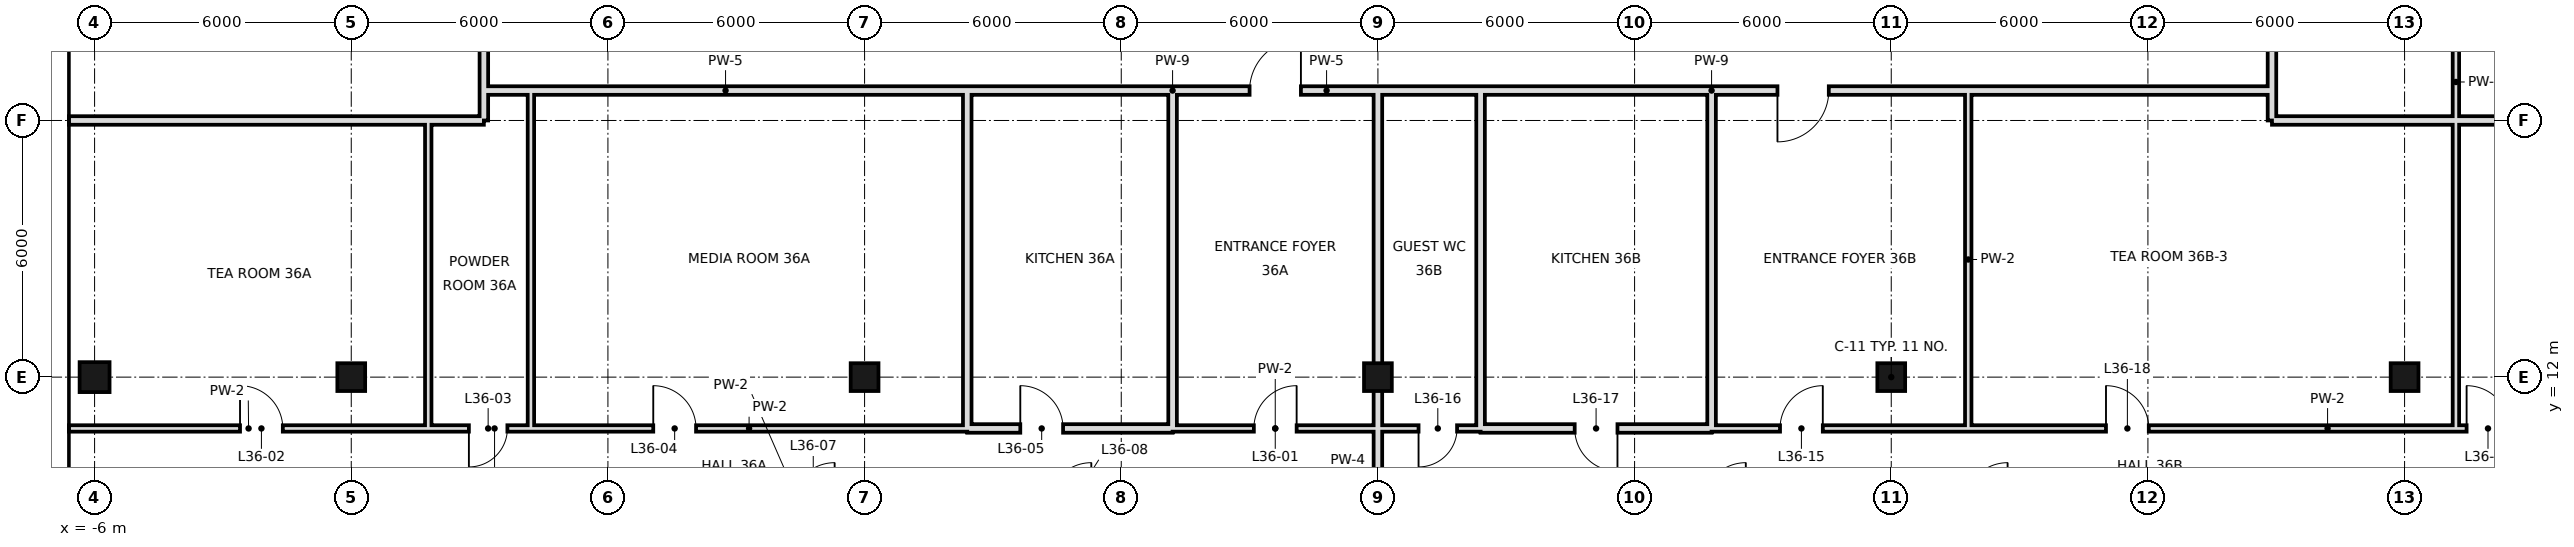
"""IFC4 building model, lengths in metres.
Left out: names, types, materials, properties, quantities, classifications, styles, units other than length and angle.
Written with IfcOpenShell. Run it as: python <this file> out.ifc"""

import sys

from ifc_helpers import new_model, si_unit, direction, frame, frame_2d, origin, origin_2d, place, context, subcontext, project, spatial, rectangle, hollow_rectangle, extrude, element, fill, save


model = new_model("IFC4")
c1 = context("Model", 3, precision=1e-05, world=origin(), true_north=direction((0.0, 1.0)))
c2 = subcontext(c1, "Body", "Model", "MODEL_VIEW")
j1 = project(units=[si_unit("LENGTHUNIT", "METRE"), si_unit("PLANEANGLEUNIT", "RADIAN")], contexts=[c1])
p1 = place(None, origin())
s1 = spatial("IfcSite", under=j1, at=p1, CompositionType="ELEMENT")
p2 = place(p1, origin())
s2 = spatial("IfcBuilding", under=s1, at=p2, CompositionType="ELEMENT")
p3 = place(p2, frame((0.0, 0.0, 158.2)))
s3 = spatial("IfcBuildingStorey", under=s2, at=p3, CompositionType="ELEMENT", Elevation=158.2)
p4 = place(p3, frame((-6.0, 12.0, 0.0), z_axis=(0.0, 0.0, 1.0), x_axis=(1.0, 0.0, 0.0)))
e1 = element("IfcColumn", 1, at=p4, inside=s3, PredefinedType="COLUMN", context=c2, shape_type="SweptSolid", body=[
    extrude(hollow_rectangle(XDim=0.7, YDim=0.7, WallThickness=0.036, at=origin_2d()), origin(), (0.0, 0.0, 1.0), 3.6),
])
for number, where, z_axis, x_axis in (
    (2, (0.0, 12.0, 0.0), (0.0, 0.0, 1.0), (1.0, 0.0, 0.0)),
    (3, (12.0, 12.0, 0.0), (0.0, 0.0, 1.0), (1.0, 0.0, 0.0)),
    (4, (24.0, 12.0, 0.0), (0.0, 0.0, 1.0), (1.0, 0.0, 0.0)),
    (5, (36.0, 12.0, 0.0), (0.0, 0.0, 1.0), (1.0, 0.0, 0.0)),
    (6, (48.0, 12.0, 0.0), (0.0, 0.0, 1.0), (1.0, 0.0, 0.0)),
):
    element("IfcColumn", number, at=place(p3, frame(where, z_axis=z_axis, x_axis=x_axis)), inside=s3, PredefinedType="COLUMN", context=c2, shape_type="SweptSolid", body=[
        extrude(hollow_rectangle(XDim=0.65, YDim=0.65, WallThickness=0.032, at=origin_2d()), origin(), (0.0, 0.0, 1.0), 3.6),
    ])
p5 = place(p3, frame((1.8, 10.8, 0.0), z_axis=(0.0, 0.0, 1.0), x_axis=(0.0, 1.0, 0.0)))
e7 = element("IfcWall", 7, at=p5, inside=s3, PredefinedType="PARTITIONING", context=c2, shape_type="SweptSolid", body=[
    extrude(rectangle(XDim=7.2, YDim=0.15, at=frame_2d((3.6, 0.0))), origin(), (0.0, 0.0, 1.0), 3.38),
])
for number, where, z_axis, x_axis in (
    (8, (14.4, 10.8, 0.0), (0.0, 0.0, 1.0), (0.0, 1.0, 0.0)),
    (9, (19.2, 10.8, 0.0), (0.0, 0.0, 1.0), (0.0, 1.0, 0.0)),
):
    element("IfcWall", number, at=place(p3, frame(where, z_axis=z_axis, x_axis=x_axis)), inside=s3, PredefinedType="SOLIDWALL", context=c2, shape_type="SweptSolid", body=[
        extrude(rectangle(XDim=7.9, YDim=0.2, at=frame_2d((3.95, 0.0))), origin(), (0.0, 0.0, 1.0), 2.68),
    ])
p6 = place(p3, frame((24.0, 0.0, 0.0), z_axis=(0.0, 0.0, 1.0), x_axis=(0.0, 1.0, 0.0)))
e10 = element("IfcWall", 10, at=p6, inside=s3, PredefinedType="SOLIDWALL", context=c2, shape_type="SweptSolid", body=[
    extrude(rectangle(XDim=18.7, YDim=0.2, at=frame_2d((9.35, 0.0))), origin(), (0.0, 0.0, 1.0), 2.68),
])
p7 = place(p3, frame((26.4, 10.8, 0.0), z_axis=(0.0, 0.0, 1.0), x_axis=(0.0, 1.0, 0.0)))
e11 = element("IfcWall", 11, at=p7, inside=s3, PredefinedType="SOLIDWALL", context=c2, shape_type="SweptSolid", body=[
    extrude(rectangle(XDim=7.9, YDim=0.2, at=frame_2d((3.95, 0.0))), origin(), (0.0, 0.0, 1.0), 2.68),
])
p8 = place(p3, frame((3.1, 18.0, 0.0), z_axis=(0.0, 0.0, 1.0), x_axis=(0.0, 1.0, 0.0)))
e12 = element("IfcWall", 12, at=p8, inside=s3, PredefinedType="SOLIDWALL", context=c2, shape_type="SweptSolid", body=[
    extrude(rectangle(XDim=30.6, YDim=0.2, at=frame_2d((15.3, 0.0))), origin(), (0.0, 0.0, 1.0), 2.68),
])
p9 = place(p8, frame((20.27, 0.0, 0.0)))
e13 = element("IfcOpeningElement", 13, at=p9, cuts=e12, PredefinedType="OPENING", context=c2, shape_type="SweptSolid", body=[
    extrude(rectangle(XDim=1.2, YDim=2.4, at=frame_2d((0.6, 1.2))), frame((0.0, 0.11, 0.0), z_axis=(0.0, -1.0, 0.0), x_axis=(1.0, 0.0, 0.0)), (0.0, 0.0, 1.0), 0.22),
])
p10 = place(p3, frame((31.8, 10.8, 0.0), z_axis=(0.0, 0.0, 1.0), x_axis=(0.0, 1.0, 0.0)))
e14 = element("IfcWall", 14, at=p10, inside=s3, PredefinedType="SOLIDWALL", context=c2, shape_type="SweptSolid", body=[
    extrude(rectangle(XDim=7.9, YDim=0.2, at=frame_2d((3.95, 0.0))), origin(), (0.0, 0.0, 1.0), 3.38),
])
for number, where, z_axis, x_axis in (
    (15, (37.8, 10.8, 0.0), (0.0, 0.0, 1.0), (0.0, 1.0, 0.0)),
    (16, (4.2, 10.8, 0.0), (0.0, 0.0, 1.0), (0.0, 1.0, 0.0)),
):
    element("IfcWall", number, at=place(p3, frame(where, z_axis=z_axis, x_axis=x_axis)), inside=s3, PredefinedType="PARTITIONING", context=c2, shape_type="SweptSolid", body=[
        extrude(rectangle(XDim=7.9, YDim=0.15, at=frame_2d((3.95, 0.0))), origin(), (0.0, 0.0, 1.0), 3.38),
    ])
p11 = place(p3, frame((44.9, 18.7, 0.0), z_axis=(0.0, 0.0, 1.0), x_axis=(0.0, 1.0, 0.0)))
e17 = element("IfcWall", 17, at=p11, inside=s3, PredefinedType="SOLIDWALL", context=c2, shape_type="SweptSolid", body=[
    extrude(rectangle(XDim=25.7, YDim=0.2, at=frame_2d((12.85, 0.0))), origin(), (0.0, 0.0, 1.0), 2.93),
])
p12 = place(p11, frame((12.5, 0.0, 0.0)))
e18 = element("IfcOpeningElement", 18, at=p12, cuts=e17, PredefinedType="OPENING", context=c2, shape_type="SweptSolid", body=[
    extrude(rectangle(XDim=1.2, YDim=2.4, at=frame_2d((0.6, 1.2))), frame((0.0, 0.11, 0.0), z_axis=(0.0, -1.0, 0.0), x_axis=(1.0, 0.0, 0.0)), (0.0, 0.0, 1.0), 0.22),
])
p13 = place(p3, frame((44.9, 18.0, 0.0), z_axis=(0.0, 0.0, 1.0), x_axis=(0.0, 1.0, 0.0)))
e19 = element("IfcWall", 19, at=p13, inside=s3, PredefinedType="SOLIDWALL", context=c2, shape_type="SweptSolid", body=[
    extrude(rectangle(XDim=0.7, YDim=0.2, at=frame_2d((0.35, 0.0))), origin(), (0.0, 0.0, 1.0), 2.93),
])
p14 = place(p3, frame((49.2, 10.8, 0.0), z_axis=(0.0, 0.0, 1.0), x_axis=(0.0, 1.0, 0.0)))
e20 = element("IfcWall", 20, at=p14, inside=s3, PredefinedType="PARTITIONING", context=c2, shape_type="SweptSolid", body=[
    extrude(rectangle(XDim=16.2, YDim=0.15, at=frame_2d((8.1, 0.0))), origin(), (0.0, 0.0, 1.0), 3.38),
])
p15 = place(p14, frame((11.2, 0.0, 0.0)))
e21 = element("IfcOpeningElement", 21, at=p15, cuts=e20, PredefinedType="OPENING", context=c2, shape_type="SweptSolid", body=[
    extrude(rectangle(XDim=1.0, YDim=2.4, at=frame_2d((0.5, 1.2))), frame((0.0, 0.085, 0.0), z_axis=(0.0, -1.0, 0.0), x_axis=(1.0, 0.0, 0.0)), (0.0, 0.0, 1.0), 0.17),
])
p16 = place(p3, frame((14.4, 10.8, 0.0), z_axis=(0.0, 0.0, 1.0), x_axis=(1.0, 0.0, 0.0)))
e22 = element("IfcWall", 22, at=p16, inside=s3, PredefinedType="SOLIDWALL", context=c2, shape_type="SweptSolid", body=[
    extrude(rectangle(XDim=4.8, YDim=0.2, at=frame_2d((2.4, 0.0))), origin(), (0.0, 0.0, 1.0), 2.68),
])
p17 = place(p16, frame((1.24, 0.0, 0.0)))
e23 = element("IfcOpeningElement", 23, at=p17, cuts=e22, PredefinedType="OPENING", context=c2, shape_type="SweptSolid", body=[
    extrude(rectangle(XDim=1.0, YDim=2.4, at=frame_2d((0.5, 1.2))), frame((0.0, 0.11, 0.0), z_axis=(0.0, -1.0, 0.0), x_axis=(1.0, 0.0, 0.0)), (0.0, 0.0, 1.0), 0.22),
])
p18 = place(p3, frame((26.4, 10.8, 0.0), z_axis=(0.0, 0.0, 1.0), x_axis=(1.0, 0.0, 0.0)))
e24 = element("IfcWall", 24, at=p18, inside=s3, PredefinedType="SOLIDWALL", context=c2, shape_type="SweptSolid", body=[
    extrude(rectangle(XDim=5.4, YDim=0.2, at=frame_2d((2.7, 0.0))), origin(), (0.0, 0.0, 1.0), 2.68),
])
p19 = place(p18, frame((2.2, 0.0, 0.0)))
e25 = element("IfcOpeningElement", 25, at=p19, cuts=e24, PredefinedType="OPENING", context=c2, shape_type="SweptSolid", body=[
    extrude(rectangle(XDim=1.0, YDim=2.4, at=frame_2d((0.5, 1.2))), frame((0.0, 0.11, 0.0), z_axis=(0.0, -1.0, 0.0), x_axis=(1.0, 0.0, 0.0)), (0.0, 0.0, 1.0), 0.22),
])
p20 = place(p3, frame((-6.6, 10.8, 0.0), z_axis=(0.0, 0.0, 1.0), x_axis=(1.0, 0.0, 0.0)))
e26 = element("IfcWall", 26, at=p20, inside=s3, PredefinedType="PARTITIONING", context=c2, shape_type="SweptSolid", body=[
    extrude(rectangle(XDim=8.4, YDim=0.15, at=frame_2d((4.2, 0.0))), origin(), (0.0, 0.0, 1.0), 3.38),
])
p21 = place(p20, frame((4.0, 0.0, 0.0)))
e27 = element("IfcOpeningElement", 27, at=p21, cuts=e26, PredefinedType="OPENING", context=c2, shape_type="SweptSolid", body=[
    extrude(rectangle(XDim=1.0, YDim=2.4, at=frame_2d((0.5, 1.2))), frame((0.0, 0.085, 0.0), z_axis=(0.0, -1.0, 0.0), x_axis=(1.0, 0.0, 0.0)), (0.0, 0.0, 1.0), 0.17),
])
p22 = place(p3, frame((4.2, 10.8, 0.0), z_axis=(0.0, 0.0, 1.0), x_axis=(1.0, 0.0, 0.0)))
e28 = element("IfcWall", 28, at=p22, inside=s3, PredefinedType="PARTITIONING", context=c2, shape_type="SweptSolid", body=[
    extrude(rectangle(XDim=10.2, YDim=0.15, at=frame_2d((5.1, 0.0))), origin(), (0.0, 0.0, 1.0), 3.38),
])
p23 = place(p22, frame((2.86, 0.0, 0.0)))
e29 = element("IfcOpeningElement", 29, at=p23, cuts=e28, PredefinedType="OPENING", context=c2, shape_type="SweptSolid", body=[
    extrude(rectangle(XDim=1.0, YDim=2.4, at=frame_2d((0.5, 1.2))), frame((0.0, 0.085, 0.0), z_axis=(0.0, -1.0, 0.0), x_axis=(1.0, 0.0, 0.0)), (0.0, 0.0, 1.0), 0.17),
])
p24 = place(p3, frame((19.2, 10.8, 0.0), z_axis=(0.0, 0.0, 1.0), x_axis=(1.0, 0.0, 0.0)))
e30 = element("IfcWall", 30, at=p24, inside=s3, PredefinedType="PARTITIONING", context=c2, shape_type="SweptSolid", body=[
    extrude(rectangle(XDim=4.8, YDim=0.15, at=frame_2d((2.4, 0.0))), origin(), (0.0, 0.0, 1.0), 3.38),
])
p25 = place(p24, frame((1.9, 0.0, 0.0)))
e31 = element("IfcOpeningElement", 31, at=p25, cuts=e30, PredefinedType="OPENING", context=c2, shape_type="SweptSolid", body=[
    extrude(rectangle(XDim=1.0, YDim=2.4, at=frame_2d((0.5, 1.2))), frame((0.0, 0.085, 0.0), z_axis=(0.0, -1.0, 0.0), x_axis=(1.0, 0.0, 0.0)), (0.0, 0.0, 1.0), 0.17),
])
p26 = place(p3, frame((31.8, 10.8, 0.0), z_axis=(0.0, 0.0, 1.0), x_axis=(1.0, 0.0, 0.0)))
e32 = element("IfcWall", 32, at=p26, inside=s3, PredefinedType="PARTITIONING", context=c2, shape_type="SweptSolid", body=[
    extrude(rectangle(XDim=28.8, YDim=0.15, at=frame_2d((14.4, 0.0))), origin(), (0.0, 0.0, 1.0), 3.38),
])
p27 = place(p26, frame((1.6, 0.0, 0.0)))
e33 = element("IfcOpeningElement", 33, at=p27, cuts=e32, PredefinedType="OPENING", context=c2, shape_type="SweptSolid", body=[
    extrude(rectangle(XDim=1.0, YDim=2.4, at=frame_2d((0.5, 1.2))), frame((0.0, 0.085, 0.0), z_axis=(0.0, -1.0, 0.0), x_axis=(1.0, 0.0, 0.0)), (0.0, 0.0, 1.0), 0.17),
])
p28 = place(p26, frame((9.22, 0.0, 0.0)))
e34 = element("IfcOpeningElement", 34, at=p28, cuts=e32, PredefinedType="OPENING", context=c2, shape_type="SweptSolid", body=[
    extrude(rectangle(XDim=1.0, YDim=2.4, at=frame_2d((0.5, 1.2))), frame((0.0, 0.085, 0.0), z_axis=(0.0, -1.0, 0.0), x_axis=(1.0, 0.0, 0.0)), (0.0, 0.0, 1.0), 0.17),
])
p29 = place(p26, frame((17.65, 0.0, 0.0)))
e35 = element("IfcOpeningElement", 35, at=p29, cuts=e32, PredefinedType="OPENING", context=c2, shape_type="SweptSolid", body=[
    extrude(rectangle(XDim=1.0, YDim=2.4, at=frame_2d((0.5, 1.2))), frame((0.0, 0.085, 0.0), z_axis=(0.0, -1.0, 0.0), x_axis=(1.0, 0.0, 0.0)), (0.0, 0.0, 1.0), 0.17),
])
p30 = place(p3, frame((1.8, 10.8, 0.0), z_axis=(0.0, 0.0, 1.0), x_axis=(1.0, 0.0, 0.0)))
e36 = element("IfcWall", 36, at=p30, inside=s3, PredefinedType="PARTITIONING", context=c2, shape_type="SweptSolid", body=[
    extrude(rectangle(XDim=2.4, YDim=0.15, at=frame_2d((1.2, 0.0))), origin(), (0.0, 0.0, 1.0), 3.38),
])
p31 = place(p30, frame((0.95, 0.0, 0.0)))
e37 = element("IfcOpeningElement", 37, at=p31, cuts=e36, PredefinedType="OPENING", context=c2, shape_type="SweptSolid", body=[
    extrude(rectangle(XDim=0.9, YDim=2.4, at=frame_2d((0.45, 1.2))), frame((0.0, 0.085, 0.0), z_axis=(0.0, -1.0, 0.0), x_axis=(1.0, 0.0, 0.0)), (0.0, 0.0, 1.0), 0.17),
])
p32 = place(p3, frame((24.0, 10.8, 0.0), z_axis=(0.0, 0.0, 1.0), x_axis=(1.0, 0.0, 0.0)))
e38 = element("IfcWall", 38, at=p32, inside=s3, PredefinedType="PARTITIONING", context=c2, shape_type="SweptSolid", body=[
    extrude(rectangle(XDim=2.4, YDim=0.15, at=frame_2d((1.2, 0.0))), origin(), (0.0, 0.0, 1.0), 3.38),
])
p33 = place(p32, frame((0.95, 0.0, 0.0)))
e39 = element("IfcOpeningElement", 39, at=p33, cuts=e38, PredefinedType="OPENING", context=c2, shape_type="SweptSolid", body=[
    extrude(rectangle(XDim=0.9, YDim=2.4, at=frame_2d((0.45, 1.2))), frame((0.0, 0.085, 0.0), z_axis=(0.0, -1.0, 0.0), x_axis=(1.0, 0.0, 0.0)), (0.0, 0.0, 1.0), 0.17),
])
p34 = place(p3, frame((-6.6, 18.0, 0.0), z_axis=(0.0, 0.0, 1.0), x_axis=(1.0, 0.0, 0.0)))
e40 = element("IfcWall", 40, at=p34, inside=s3, PredefinedType="SOLIDWALL", context=c2, shape_type="SweptSolid", body=[
    extrude(rectangle(XDim=9.7, YDim=0.2, at=frame_2d((4.85, 0.0))), origin(), (0.0, 0.0, 1.0), 2.68),
])
p35 = place(p3, frame((44.9, 18.0, 0.0), z_axis=(0.0, 0.0, 1.0), x_axis=(1.0, 0.0, 0.0)))
e41 = element("IfcWall", 41, at=p35, inside=s3, PredefinedType="SOLIDWALL", context=c2, shape_type="SweptSolid", body=[
    extrude(rectangle(XDim=15.7, YDim=0.2, at=frame_2d((7.85, 0.0))), origin(), (0.0, 0.0, 1.0), 2.68),
])
p36 = place(p3, frame((3.1, 18.7, 0.0), z_axis=(0.0, 0.0, 1.0), x_axis=(1.0, 0.0, 0.0)))
e42 = element("IfcWall", 42, at=p36, inside=s3, PredefinedType="SOLIDWALL", context=c2, shape_type="SweptSolid", body=[
    extrude(rectangle(XDim=11.3, YDim=0.2, at=frame_2d((5.65, 0.0))), origin(), (0.0, 0.0, 1.0), 2.68),
])
p37 = place(p3, frame((19.2, 18.7, 0.0), z_axis=(0.0, 0.0, 1.0), x_axis=(1.0, 0.0, 0.0)))
e43 = element("IfcWall", 43, at=p37, inside=s3, PredefinedType="SOLIDWALL", context=c2, shape_type="SweptSolid", body=[
    extrude(rectangle(XDim=7.2, YDim=0.2, at=frame_2d((3.6, 0.0))), origin(), (0.0, 0.0, 1.0), 3.38),
])
p38 = place(p37, frame((1.8, 0.0, 0.0)))
e44 = element("IfcOpeningElement", 44, at=p38, cuts=e43, PredefinedType="OPENING", context=c2, shape_type="SweptSolid", body=[
    extrude(rectangle(XDim=1.2, YDim=2.4, at=frame_2d((0.6, 1.2))), frame((0.0, 0.11, 0.0), z_axis=(0.0, -1.0, 0.0), x_axis=(1.0, 0.0, 0.0)), (0.0, 0.0, 1.0), 0.22),
])
p39 = place(p3, frame((31.8, 18.7, 0.0), z_axis=(0.0, 0.0, 1.0), x_axis=(1.0, 0.0, 0.0)))
e45 = element("IfcWall", 45, at=p39, inside=s3, PredefinedType="SOLIDWALL", context=c2, shape_type="SweptSolid", body=[
    extrude(rectangle(XDim=13.1, YDim=0.2, at=frame_2d((6.55, 0.0))), origin(), (0.0, 0.0, 1.0), 2.68),
])
p40 = place(p39, frame((1.54, 0.0, 0.0)))
e46 = element("IfcOpeningElement", 46, at=p40, cuts=e45, PredefinedType="OPENING", context=c2, shape_type="SweptSolid", body=[
    extrude(rectangle(XDim=1.2, YDim=2.4, at=frame_2d((0.6, 1.2))), frame((0.0, 0.11, 0.0), z_axis=(0.0, -1.0, 0.0), x_axis=(1.0, 0.0, 0.0)), (0.0, 0.0, 1.0), 0.22),
])
p41 = place(p3, frame((14.4, 18.7, 0.0), z_axis=(0.0, 0.0, 1.0), x_axis=(1.0, 0.0, 0.0)))
e47 = element("IfcWall", 47, at=p41, inside=s3, PredefinedType="SOLIDWALL", context=c2, shape_type="SweptSolid", body=[
    extrude(rectangle(XDim=4.8, YDim=0.2, at=frame_2d((2.4, 0.0))), origin(), (0.0, 0.0, 1.0), 2.68),
])
p42 = place(p3, frame((26.4, 18.7, 0.0), z_axis=(0.0, 0.0, 1.0), x_axis=(1.0, 0.0, 0.0)))
e48 = element("IfcWall", 48, at=p42, inside=s3, PredefinedType="SOLIDWALL", context=c2, shape_type="SweptSolid", body=[
    extrude(rectangle(XDim=5.4, YDim=0.2, at=frame_2d((2.7, 0.0))), origin(), (0.0, 0.0, 1.0), 2.68),
])
p43 = place(p25, frame((1.0, 0.0, 0.0), z_axis=(0.0, 0.0, 1.0), x_axis=(-1.0, 0.0, 0.0)))
e49 = element("IfcDoor", 49, at=p43, inside=s3, OperationType="SINGLE_SWING_LEFT", PredefinedType="DOOR", context=c2, shape_type="SweptSolid", body=[
    extrude(rectangle(XDim=1.0, YDim=2.4, at=frame_2d((0.5, 1.2))), frame((0.0, 0.025, 0.0), z_axis=(0.0, -1.0, 0.0), x_axis=(1.0, 0.0, 0.0)), (0.0, 0.0, 1.0), 0.05),
])
fill(e31, e49)
p44 = place(p21, origin())
e50 = element("IfcDoor", 50, at=p44, inside=s3, OperationType="SINGLE_SWING_LEFT", PredefinedType="DOOR", context=c2, shape_type="SweptSolid", body=[
    extrude(rectangle(XDim=1.0, YDim=2.4, at=frame_2d((0.5, 1.2))), frame((0.0, 0.025, 0.0), z_axis=(0.0, -1.0, 0.0), x_axis=(1.0, 0.0, 0.0)), (0.0, 0.0, 1.0), 0.05),
])
fill(e27, e50)
p45 = place(p31, frame((0.9, 0.0, 0.0), z_axis=(0.0, 0.0, 1.0), x_axis=(-1.0, 0.0, 0.0)))
e51 = element("IfcDoor", 51, at=p45, inside=s3, OperationType="SINGLE_SWING_RIGHT", PredefinedType="DOOR", context=c2, shape_type="SweptSolid", body=[
    extrude(rectangle(XDim=0.9, YDim=2.4, at=frame_2d((0.45, 1.2))), frame((0.0, 0.025, 0.0), z_axis=(0.0, -1.0, 0.0), x_axis=(1.0, 0.0, 0.0)), (0.0, 0.0, 1.0), 0.05),
])
fill(e37, e51)
p46 = place(p23, origin())
e52 = element("IfcDoor", 52, at=p46, inside=s3, OperationType="SINGLE_SWING_LEFT", PredefinedType="DOOR", context=c2, shape_type="SweptSolid", body=[
    extrude(rectangle(XDim=1.0, YDim=2.4, at=frame_2d((0.5, 1.2))), frame((0.0, 0.025, 0.0), z_axis=(0.0, -1.0, 0.0), x_axis=(1.0, 0.0, 0.0)), (0.0, 0.0, 1.0), 0.05),
])
fill(e29, e52)
p47 = place(p17, origin())
e53 = element("IfcDoor", 53, at=p47, inside=s3, OperationType="SINGLE_SWING_LEFT", PredefinedType="DOOR", context=c2, shape_type="SweptSolid", body=[
    extrude(rectangle(XDim=1.0, YDim=2.4, at=frame_2d((0.5, 1.2))), frame((0.0, 0.025, 0.0), z_axis=(0.0, -1.0, 0.0), x_axis=(1.0, 0.0, 0.0)), (0.0, 0.0, 1.0), 0.05),
])
fill(e23, e53)
p48 = place(p27, frame((1.0, 0.0, 0.0), z_axis=(0.0, 0.0, 1.0), x_axis=(-1.0, 0.0, 0.0)))
e54 = element("IfcDoor", 54, at=p48, inside=s3, OperationType="SINGLE_SWING_LEFT", PredefinedType="DOOR", context=c2, shape_type="SweptSolid", body=[
    extrude(rectangle(XDim=1.0, YDim=2.4, at=frame_2d((0.5, 1.2))), frame((0.0, 0.025, 0.0), z_axis=(0.0, -1.0, 0.0), x_axis=(1.0, 0.0, 0.0)), (0.0, 0.0, 1.0), 0.05),
])
fill(e33, e54)
p49 = place(p33, frame((0.9, 0.0, 0.0), z_axis=(0.0, 0.0, 1.0), x_axis=(-1.0, 0.0, 0.0)))
e55 = element("IfcDoor", 55, at=p49, inside=s3, OperationType="SINGLE_SWING_RIGHT", PredefinedType="DOOR", context=c2, shape_type="SweptSolid", body=[
    extrude(rectangle(XDim=0.9, YDim=2.4, at=frame_2d((0.45, 1.2))), frame((0.0, 0.025, 0.0), z_axis=(0.0, -1.0, 0.0), x_axis=(1.0, 0.0, 0.0)), (0.0, 0.0, 1.0), 0.05),
])
fill(e39, e55)
p50 = place(p19, origin())
e56 = element("IfcDoor", 56, at=p50, inside=s3, OperationType="SINGLE_SWING_RIGHT", PredefinedType="DOOR", context=c2, shape_type="SweptSolid", body=[
    extrude(rectangle(XDim=1.0, YDim=2.4, at=frame_2d((0.5, 1.2))), frame((0.0, 0.025, 0.0), z_axis=(0.0, -1.0, 0.0), x_axis=(1.0, 0.0, 0.0)), (0.0, 0.0, 1.0), 0.05),
])
fill(e25, e56)
p51 = place(p28, origin())
e57 = element("IfcDoor", 57, at=p51, inside=s3, OperationType="SINGLE_SWING_LEFT", PredefinedType="DOOR", context=c2, shape_type="SweptSolid", body=[
    extrude(rectangle(XDim=1.0, YDim=2.4, at=frame_2d((0.5, 1.2))), frame((0.0, 0.025, 0.0), z_axis=(0.0, -1.0, 0.0), x_axis=(1.0, 0.0, 0.0)), (0.0, 0.0, 1.0), 0.05),
])
fill(e34, e57)
p52 = place(p29, origin())
e58 = element("IfcDoor", 58, at=p52, inside=s3, OperationType="SINGLE_SWING_LEFT", PredefinedType="DOOR", context=c2, shape_type="SweptSolid", body=[
    extrude(rectangle(XDim=1.0, YDim=2.4, at=frame_2d((0.5, 1.2))), frame((0.0, 0.025, 0.0), z_axis=(0.0, -1.0, 0.0), x_axis=(1.0, 0.0, 0.0)), (0.0, 0.0, 1.0), 0.05),
])
fill(e35, e58)
p53 = place(p38, frame((1.2, 0.0, 0.0), z_axis=(0.0, 0.0, 1.0), x_axis=(-1.0, 0.0, 0.0)))
e59 = element("IfcDoor", 59, at=p53, inside=s3, OperationType="SINGLE_SWING_LEFT", PredefinedType="DOOR", context=c2, shape_type="SweptSolid", body=[
    extrude(rectangle(XDim=1.2, YDim=2.4, at=frame_2d((0.6, 1.2))), frame((0.0, 0.025, 0.0), z_axis=(0.0, -1.0, 0.0), x_axis=(1.0, 0.0, 0.0)), (0.0, 0.0, 1.0), 0.05),
])
fill(e44, e59)
p54 = place(p40, frame((1.2, 0.0, 0.0), z_axis=(0.0, 0.0, 1.0), x_axis=(-1.0, 0.0, 0.0)))
e60 = element("IfcDoor", 60, at=p54, inside=s3, OperationType="SINGLE_SWING_RIGHT", PredefinedType="DOOR", context=c2, shape_type="SweptSolid", body=[
    extrude(rectangle(XDim=1.2, YDim=2.4, at=frame_2d((0.6, 1.2))), frame((0.0, 0.025, 0.0), z_axis=(0.0, -1.0, 0.0), x_axis=(1.0, 0.0, 0.0)), (0.0, 0.0, 1.0), 0.05),
])
fill(e46, e60)
save(model, sys.argv[1])
